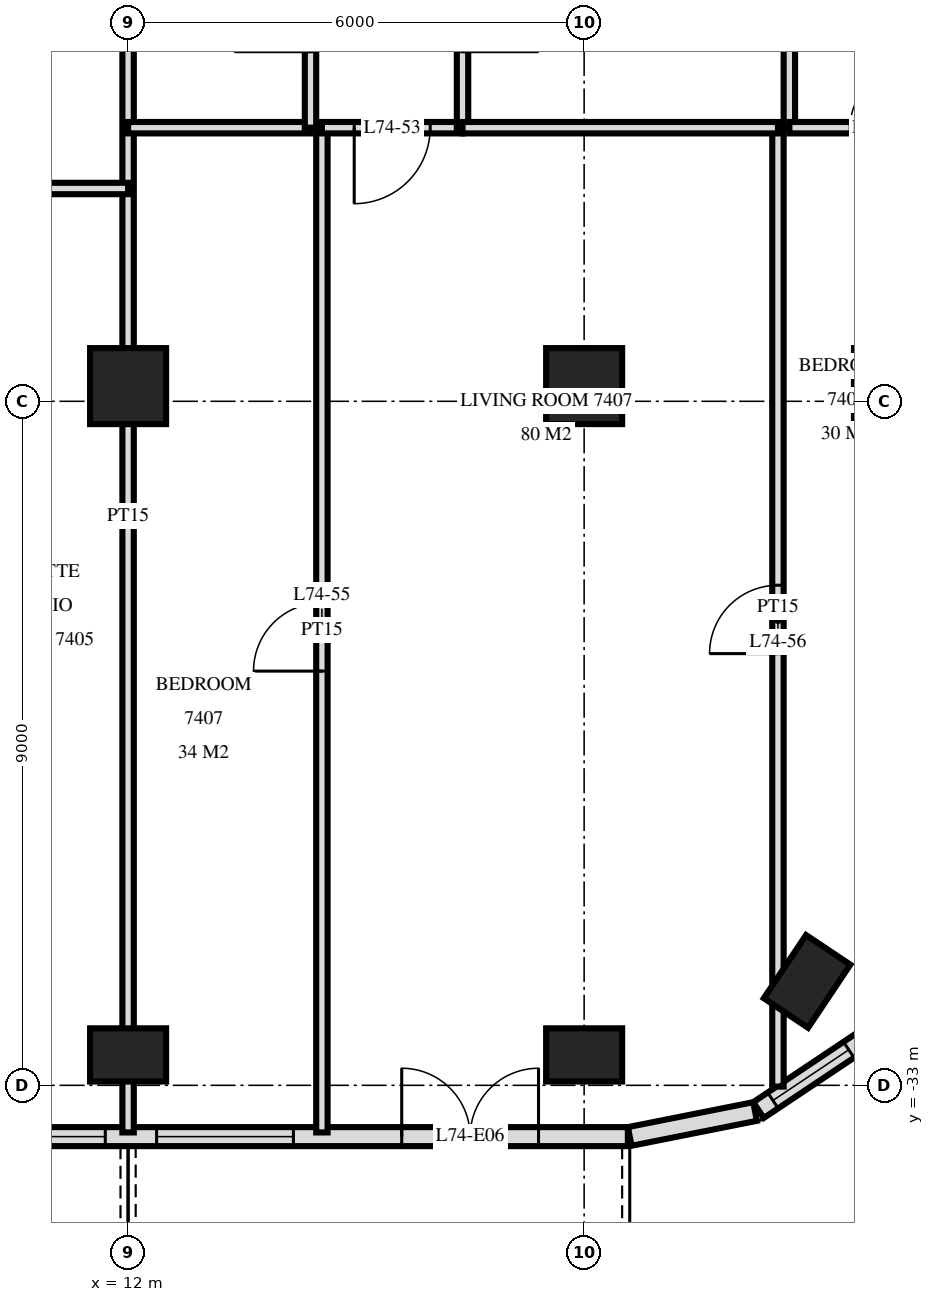
"""IFC4 building model, lengths in metres.
Left out: names, types, materials, properties, quantities, classifications, styles, units other than length and angle.
Written with IfcOpenShell. Run it as: python <this file> out.ifc"""

import sys

from ifc_helpers import new_model, si_unit, direction, frame, frame_2d, origin, origin_2d, place, context, subcontext, project, spatial, rectangle, extrude, element, fill, save


model = new_model("IFC4")
c1 = context("Model", 3, precision=1e-05, world=origin(), true_north=direction((0.0, 1.0)))
c2 = subcontext(c1, "Body", "Model", "MODEL_VIEW")
j1 = project(units=[si_unit("LENGTHUNIT", "METRE"), si_unit("PLANEANGLEUNIT", "RADIAN")], contexts=[c1])
p1 = place(None, origin())
s1 = spatial("IfcSite", under=j1, at=p1, CompositionType="ELEMENT")
p2 = place(p1, origin())
s2 = spatial("IfcBuilding", under=s1, at=p2, CompositionType="ELEMENT")
p3 = place(p2, frame((0.0, 0.0, 280.6)))
s3 = spatial("IfcBuildingStorey", under=s2, at=p3, CompositionType="ELEMENT", Elevation=280.6)
p4 = place(p3, frame((12.0, -32.6, 0.0), z_axis=(0.0, 0.0, 1.0), x_axis=(1.0, 0.0, 0.0)))
e1 = element("IfcColumn", 1, at=p4, inside=s3, PredefinedType="COLUMN", context=c2, shape_type="SweptSolid", body=[
    extrude(rectangle(XDim=1.0, YDim=0.7, at=origin_2d()), origin(), (0.0, 0.0, 1.0), 3.5),
])
p5 = place(p3, frame((12.0, -23.8, 0.0), z_axis=(0.0, 0.0, 1.0), x_axis=(1.0, 0.0, 0.0)))
e2 = element("IfcColumn", 2, at=p5, inside=s3, PredefinedType="COLUMN", context=c2, shape_type="SweptSolid", body=[
    extrude(rectangle(XDim=1.0, YDim=1.0, at=origin_2d()), origin(), (0.0, 0.0, 1.0), 3.5),
])
p6 = place(p3, frame((18.0, -32.6, 0.0), z_axis=(0.0, 0.0, 1.0), x_axis=(1.0, 0.0, 0.0)))
e3 = element("IfcColumn", 3, at=p6, inside=s3, PredefinedType="COLUMN", context=c2, shape_type="SweptSolid", body=[
    extrude(rectangle(XDim=1.0, YDim=0.7, at=origin_2d()), origin(), (0.0, 0.0, 1.0), 3.5),
])
p7 = place(p3, frame((18.0, -23.8, 0.0), z_axis=(0.0, 0.0, 1.0), x_axis=(1.0, 0.0, 0.0)))
e4 = element("IfcColumn", 4, at=p7, inside=s3, PredefinedType="COLUMN", context=c2, shape_type="SweptSolid", body=[
    extrude(rectangle(XDim=1.0, YDim=1.0, at=origin_2d()), origin(), (0.0, 0.0, 1.0), 3.5),
])
for number, where, z_axis, x_axis in (
    (5, (20.933, -31.633, 0.0), (0.0, 0.0, 1.0), (0.556, 0.831, 0.0)),
    (6, (21.9, -23.8, 0.0), (0.0, 0.0, 1.0), (0.0, 1.0, 0.0)),
):
    element("IfcColumn", number, at=place(p3, frame(where, z_axis=z_axis, x_axis=x_axis)), inside=s3, PredefinedType="COLUMN", context=c2, shape_type="SweptSolid", body=[
        extrude(rectangle(XDim=1.0, YDim=0.7, at=origin_2d()), origin(), (0.0, 0.0, 1.0), 3.5),
    ])
p8 = place(p3, frame((-18.575, -33.675, 0.0), z_axis=(0.0, 0.0, 1.0), x_axis=(1.0, 0.0, 0.0)))
e7 = element("IfcWall", 7, at=p8, inside=s3, PredefinedType="SOLIDWALL", context=c2, shape_type="SweptSolid", body=[
    extrude(rectangle(XDim=37.151, YDim=0.25, at=frame_2d((18.575, 0.0))), origin(), (0.0, 0.0, 1.0), 3.22),
])
p9 = place(p8, frame((4.175, 0.0, 0.0)))
e8 = element("IfcOpeningElement", 8, at=p9, cuts=e7, PredefinedType="OPENING", context=c2, shape_type="SweptSolid", body=[
    extrude(rectangle(XDim=1.8, YDim=2.4, at=frame_2d((0.9, 1.2))), frame((0.0, 0.135, 0.0), z_axis=(0.0, -1.0, 0.0), x_axis=(1.0, 0.0, 0.0)), (0.0, 0.0, 1.0), 0.27),
])
p10 = place(p8, frame((7.512, 0.0, 0.0)))
e9 = element("IfcOpeningElement", 9, at=p10, cuts=e7, PredefinedType="OPENING", context=c2, shape_type="SweptSolid", body=[
    extrude(rectangle(XDim=1.8, YDim=2.4, at=frame_2d((0.9, 1.2))), frame((0.0, 0.135, 0.0), z_axis=(0.0, -1.0, 0.0), x_axis=(1.0, 0.0, 0.0)), (0.0, 0.0, 1.0), 0.27),
])
p11 = place(p8, frame((10.287, 0.0, 0.9)))
e10 = element("IfcOpeningElement", 10, at=p11, cuts=e7, PredefinedType="OPENING", context=c2, shape_type="SweptSolid", body=[
    extrude(rectangle(XDim=1.8, YDim=1.5, at=frame_2d((0.9, 0.75))), frame((0.0, 0.135, 0.0), z_axis=(0.0, -1.0, 0.0), x_axis=(1.0, 0.0, 0.0)), (0.0, 0.0, 1.0), 0.27),
])
p12 = place(p8, frame((12.875, 0.0, 0.9)))
e11 = element("IfcOpeningElement", 11, at=p12, cuts=e7, PredefinedType="OPENING", context=c2, shape_type="SweptSolid", body=[
    extrude(rectangle(XDim=2.4, YDim=1.5, at=frame_2d((1.2, 0.75))), frame((0.0, 0.135, 0.0), z_axis=(0.0, -1.0, 0.0), x_axis=(1.0, 0.0, 0.0)), (0.0, 0.0, 1.0), 0.27),
])
p13 = place(p8, frame((16.175, 0.0, 0.0)))
e12 = element("IfcOpeningElement", 12, at=p13, cuts=e7, PredefinedType="OPENING", context=c2, shape_type="SweptSolid", body=[
    extrude(rectangle(XDim=1.8, YDim=2.4, at=frame_2d((0.9, 1.2))), frame((0.0, 0.135, 0.0), z_axis=(0.0, -1.0, 0.0), x_axis=(1.0, 0.0, 0.0)), (0.0, 0.0, 1.0), 0.27),
])
p14 = place(p8, frame((19.175, 0.0, 0.0)))
e13 = element("IfcOpeningElement", 13, at=p14, cuts=e7, PredefinedType="OPENING", context=c2, shape_type="SweptSolid", body=[
    extrude(rectangle(XDim=1.8, YDim=2.4, at=frame_2d((0.9, 1.2))), frame((0.0, 0.135, 0.0), z_axis=(0.0, -1.0, 0.0), x_axis=(1.0, 0.0, 0.0)), (0.0, 0.0, 1.0), 0.27),
])
p15 = place(p8, frame((21.875, 0.0, 0.9)))
e14 = element("IfcOpeningElement", 14, at=p15, cuts=e7, PredefinedType="OPENING", context=c2, shape_type="SweptSolid", body=[
    extrude(rectangle(XDim=2.4, YDim=1.5, at=frame_2d((1.2, 0.75))), frame((0.0, 0.135, 0.0), z_axis=(0.0, -1.0, 0.0), x_axis=(1.0, 0.0, 0.0)), (0.0, 0.0, 1.0), 0.27),
])
p16 = place(p8, frame((25.175, 0.0, 0.0)))
e15 = element("IfcOpeningElement", 15, at=p16, cuts=e7, PredefinedType="OPENING", context=c2, shape_type="SweptSolid", body=[
    extrude(rectangle(XDim=1.8, YDim=2.4, at=frame_2d((0.9, 1.2))), frame((0.0, 0.135, 0.0), z_axis=(0.0, -1.0, 0.0), x_axis=(1.0, 0.0, 0.0)), (0.0, 0.0, 1.0), 0.27),
])
p17 = place(p8, frame((27.875, 0.0, 0.9)))
e16 = element("IfcOpeningElement", 16, at=p17, cuts=e7, PredefinedType="OPENING", context=c2, shape_type="SweptSolid", body=[
    extrude(rectangle(XDim=2.4, YDim=1.5, at=frame_2d((1.2, 0.75))), frame((0.0, 0.135, 0.0), z_axis=(0.0, -1.0, 0.0), x_axis=(1.0, 0.0, 0.0)), (0.0, 0.0, 1.0), 0.27),
])
p18 = place(p8, frame((30.95, 0.0, 0.9)))
e17 = element("IfcOpeningElement", 17, at=p18, cuts=e7, PredefinedType="OPENING", context=c2, shape_type="SweptSolid", body=[
    extrude(rectangle(XDim=1.8, YDim=1.5, at=frame_2d((0.9, 0.75))), frame((0.0, 0.135, 0.0), z_axis=(0.0, -1.0, 0.0), x_axis=(1.0, 0.0, 0.0)), (0.0, 0.0, 1.0), 0.27),
])
p19 = place(p8, frame((34.175, 0.0, 0.0)))
e18 = element("IfcOpeningElement", 18, at=p19, cuts=e7, PredefinedType="OPENING", context=c2, shape_type="SweptSolid", body=[
    extrude(rectangle(XDim=1.8, YDim=2.4, at=frame_2d((0.9, 1.2))), frame((0.0, 0.135, 0.0), z_axis=(0.0, -1.0, 0.0), x_axis=(1.0, 0.0, 0.0)), (0.0, 0.0, 1.0), 0.27),
])
p20 = place(p3, frame((18.6, -33.673, 0.0), z_axis=(0.0, 0.0, 1.0), x_axis=(0.980770110232, 0.195166572128, 0.0)))
e19 = element("IfcWall", 19, at=p20, inside=s3, PredefinedType="SOLIDWALL", context=c2, shape_type="SweptSolid", body=[
    extrude(rectangle(XDim=1.681, YDim=0.25, at=frame_2d((0.841, 0.0))), origin(), (0.0, 0.0, 1.0), 3.22),
])
p21 = place(p3, frame((20.294, -33.326, 0.0), z_axis=(0.0, 0.0, 1.0), x_axis=(0.831482937015, 0.55555029066, 0.0)))
e20 = element("IfcWall", 20, at=p21, inside=s3, PredefinedType="SOLIDWALL", context=c2, shape_type="SweptSolid", body=[
    extrude(rectangle(XDim=1.656, YDim=0.25, at=frame_2d((0.828, 0.0))), origin(), (0.0, 0.0, 1.0), 3.22),
])
p22 = place(p21, frame((0.228, 0.0, 0.9)))
e21 = element("IfcOpeningElement", 21, at=p22, cuts=e20, PredefinedType="OPENING", context=c2, shape_type="SweptSolid", body=[
    extrude(rectangle(XDim=1.2, YDim=1.5, at=frame_2d((0.6, 0.75))), frame((0.0, 0.135, 0.0), z_axis=(0.0, -1.0, 0.0), x_axis=(1.0, 0.0, 0.0)), (0.0, 0.0, 1.0), 0.27),
])
p23 = place(p3, frame((20.7, -20.4, 0.0), z_axis=(0.0, 0.0, 1.0), x_axis=(0.0, 1.0, 0.0)))
e22 = element("IfcWall", 22, at=p23, inside=s3, PredefinedType="PARTITIONING", context=c2, shape_type="SweptSolid", body=[
    extrude(rectangle(XDim=3.0, YDim=0.15, at=frame_2d((1.5, 0.0))), origin(), (0.0, 0.0, 1.0), 3.22),
])
p24 = place(p3, frame((20.55, -33.017, 0.0), z_axis=(0.0, 0.0, 1.0), x_axis=(0.0, 1.0, 0.0)))
e23 = element("IfcWall", 23, at=p24, inside=s3, PredefinedType="PARTITIONING", context=c2, shape_type="SweptSolid", body=[
    extrude(rectangle(XDim=12.617, YDim=0.15, at=frame_2d((6.308, 0.0))), origin(), (0.0, 0.0, 1.0), 3.22),
])
p25 = place(p24, frame((5.697, 0.0, 0.0)))
e24 = element("IfcOpeningElement", 24, at=p25, cuts=e23, PredefinedType="OPENING", context=c2, shape_type="SweptSolid", body=[
    extrude(rectangle(XDim=0.9, YDim=2.1, at=frame_2d((0.45, 1.05))), frame((0.0, 0.085, 0.0), z_axis=(0.0, -1.0, 0.0), x_axis=(1.0, 0.0, 0.0)), (0.0, 0.0, 1.0), 0.17),
])
p26 = place(p3, frame((16.4, -20.4, 0.0), z_axis=(0.0, 0.0, 1.0), x_axis=(0.0, 1.0, 0.0)))
e25 = element("IfcWall", 25, at=p26, inside=s3, PredefinedType="PARTITIONING", context=c2, shape_type="SweptSolid", body=[
    extrude(rectangle(XDim=3.0, YDim=0.15, at=frame_2d((1.5, 0.0))), origin(), (0.0, 0.0, 1.0), 3.22),
])
p27 = place(p26, frame((1.0, 0.0, 0.0)))
e26 = element("IfcOpeningElement", 26, at=p27, cuts=e25, PredefinedType="OPENING", context=c2, shape_type="SweptSolid", body=[
    extrude(rectangle(XDim=1.0, YDim=2.1, at=frame_2d((0.5, 1.05))), frame((0.0, 0.085, 0.0), z_axis=(0.0, -1.0, 0.0), x_axis=(1.0, 0.0, 0.0)), (0.0, 0.0, 1.0), 0.17),
])
p28 = place(p3, frame((14.55, -33.62, 0.0), z_axis=(0.0, 0.0, 1.0), x_axis=(0.0, 1.0, 0.0)))
e27 = element("IfcWall", 27, at=p28, inside=s3, PredefinedType="PARTITIONING", context=c2, shape_type="SweptSolid", body=[
    extrude(rectangle(XDim=13.22, YDim=0.15, at=frame_2d((6.61, 0.0))), origin(), (0.0, 0.0, 1.0), 3.22),
])
p29 = place(p28, frame((6.07, 0.0, 0.0)))
e28 = element("IfcOpeningElement", 28, at=p29, cuts=e27, PredefinedType="OPENING", context=c2, shape_type="SweptSolid", body=[
    extrude(rectangle(XDim=0.9, YDim=2.1, at=frame_2d((0.45, 1.05))), frame((0.0, 0.085, 0.0), z_axis=(0.0, -1.0, 0.0), x_axis=(1.0, 0.0, 0.0)), (0.0, 0.0, 1.0), 0.17),
])
p30 = place(p3, frame((14.4, -20.4, 0.0), z_axis=(0.0, 0.0, 1.0), x_axis=(0.0, 1.0, 0.0)))
e29 = element("IfcWall", 29, at=p30, inside=s3, PredefinedType="PARTITIONING", context=c2, shape_type="SweptSolid", body=[
    extrude(rectangle(XDim=3.0, YDim=0.15, at=frame_2d((1.5, 0.0))), origin(), (0.0, 0.0, 1.0), 3.22),
])
p31 = place(p30, frame((1.0, 0.0, 0.0)))
e30 = element("IfcOpeningElement", 30, at=p31, cuts=e29, PredefinedType="OPENING", context=c2, shape_type="SweptSolid", body=[
    extrude(rectangle(XDim=1.0, YDim=2.1, at=frame_2d((0.5, 1.05))), frame((0.0, 0.085, 0.0), z_axis=(0.0, -1.0, 0.0), x_axis=(1.0, 0.0, 0.0)), (0.0, 0.0, 1.0), 0.17),
])
p32 = place(p3, frame((12.0, -33.62, 0.0), z_axis=(0.0, 0.0, 1.0), x_axis=(0.0, 1.0, 0.0)))
e31 = element("IfcWall", 31, at=p32, inside=s3, PredefinedType="PARTITIONING", context=c2, shape_type="SweptSolid", body=[
    extrude(rectangle(XDim=16.22, YDim=0.15, at=frame_2d((8.11, 0.0))), origin(), (0.0, 0.0, 1.0), 3.22),
])
p33 = place(p3, frame((10.3, -21.2, 0.0), z_axis=(0.0, 0.0, 1.0), x_axis=(1.0, 0.0, 0.0)))
e32 = element("IfcWall", 32, at=p33, inside=s3, PredefinedType="PARTITIONING", context=c2, shape_type="SweptSolid", body=[
    extrude(rectangle(XDim=1.7, YDim=0.15, at=frame_2d((0.85, 0.0))), origin(), (0.0, 0.0, 1.0), 3.22),
])
p34 = place(p3, frame((14.55, -20.4, 0.0), z_axis=(0.0, 0.0, 1.0), x_axis=(1.0, 0.0, 0.0)))
e33 = element("IfcWall", 33, at=p34, inside=s3, PredefinedType="PARTITIONING", context=c2, shape_type="SweptSolid", body=[
    extrude(rectangle(XDim=1.85, YDim=0.15, at=frame_2d((0.925, 0.0))), origin(), (0.0, 0.0, 1.0), 3.22),
])
p35 = place(p34, frame((0.425, 0.0, 0.0)))
e34 = element("IfcOpeningElement", 34, at=p35, cuts=e33, PredefinedType="OPENING", context=c2, shape_type="SweptSolid", body=[
    extrude(rectangle(XDim=1.0, YDim=2.1, at=frame_2d((0.5, 1.05))), frame((0.0, 0.085, 0.0), z_axis=(0.0, -1.0, 0.0), x_axis=(1.0, 0.0, 0.0)), (0.0, 0.0, 1.0), 0.17),
])
p36 = place(p3, frame((12.0, -20.4, 0.0), z_axis=(0.0, 0.0, 1.0), x_axis=(1.0, 0.0, 0.0)))
e35 = element("IfcWall", 35, at=p36, inside=s3, PredefinedType="PARTITIONING", context=c2, shape_type="SweptSolid", body=[
    extrude(rectangle(XDim=2.4, YDim=0.15, at=frame_2d((1.2, 0.0))), origin(), (0.0, 0.0, 1.0), 3.22),
])
p37 = place(p3, frame((16.4, -20.4, 0.0), z_axis=(0.0, 0.0, 1.0), x_axis=(1.0, 0.0, 0.0)))
e36 = element("IfcWall", 36, at=p37, inside=s3, PredefinedType="PARTITIONING", context=c2, shape_type="SweptSolid", body=[
    extrude(rectangle(XDim=4.15, YDim=0.15, at=frame_2d((2.075, 0.0))), origin(), (0.0, 0.0, 1.0), 3.22),
])
p38 = place(p3, frame((20.7, -20.4, 0.0), z_axis=(0.0, 0.0, 1.0), x_axis=(1.0, 0.0, 0.0)))
e37 = element("IfcWall", 37, at=p38, inside=s3, PredefinedType="PARTITIONING", context=c2, shape_type="SweptSolid", body=[
    extrude(rectangle(XDim=2.22, YDim=0.15, at=frame_2d((1.11, 0.0))), origin(), (0.0, 0.0, 1.0), 3.22),
])
p39 = place(p38, frame((0.8, 0.0, 0.0)))
e38 = element("IfcOpeningElement", 38, at=p39, cuts=e37, PredefinedType="OPENING", context=c2, shape_type="SweptSolid", body=[
    extrude(rectangle(XDim=0.8, YDim=2.1, at=frame_2d((0.4, 1.05))), frame((0.0, 0.085, 0.0), z_axis=(0.0, -1.0, 0.0), x_axis=(1.0, 0.0, 0.0)), (0.0, 0.0, 1.0), 0.17),
])
p40 = place(p22, origin())
e39 = element("IfcWindow", 39, at=p40, inside=s3, PartitioningType="SINGLE_PANEL", PredefinedType="WINDOW", context=c2, shape_type="SweptSolid", body=[
    extrude(rectangle(XDim=1.2, YDim=1.5, at=frame_2d((0.6, 0.75))), frame((0.0, 0.03, 0.0), z_axis=(0.0, -1.0, 0.0), x_axis=(1.0, 0.0, 0.0)), (0.0, 0.0, 1.0), 0.06),
])
fill(e21, e39)
p41 = place(p17, origin())
e40 = element("IfcWindow", 40, at=p41, inside=s3, PartitioningType="SINGLE_PANEL", PredefinedType="WINDOW", context=c2, shape_type="SweptSolid", body=[
    extrude(rectangle(XDim=2.4, YDim=1.5, at=frame_2d((1.2, 0.75))), frame((0.0, 0.03, 0.0), z_axis=(0.0, -1.0, 0.0), x_axis=(1.0, 0.0, 0.0)), (0.0, 0.0, 1.0), 0.06),
])
fill(e16, e40)
p42 = place(p18, origin())
e41 = element("IfcWindow", 41, at=p42, inside=s3, PartitioningType="SINGLE_PANEL", PredefinedType="WINDOW", context=c2, shape_type="SweptSolid", body=[
    extrude(rectangle(XDim=1.8, YDim=1.5, at=frame_2d((0.9, 0.75))), frame((0.0, 0.03, 0.0), z_axis=(0.0, -1.0, 0.0), x_axis=(1.0, 0.0, 0.0)), (0.0, 0.0, 1.0), 0.06),
])
fill(e17, e41)
p43 = place(p19, origin())
e42 = element("IfcDoor", 42, at=p43, inside=s3, OperationType="DOUBLE_DOOR_SINGLE_SWING", PredefinedType="DOOR", context=c2, shape_type="SweptSolid", body=[
    extrude(rectangle(XDim=1.8, YDim=2.4, at=frame_2d((0.9, 1.2))), frame((0.0, 0.025, 0.0), z_axis=(0.0, -1.0, 0.0), x_axis=(1.0, 0.0, 0.0)), (0.0, 0.0, 1.0), 0.05),
])
fill(e18, e42)
p44 = place(p35, frame((0.5, 0.0, 0.0), z_axis=(0.0, 0.0, 1.0), x_axis=(-1.0, 0.0, 0.0)))
e43 = element("IfcDoor", 43, at=p44, inside=s3, OperationType="SINGLE_SWING_LEFT", PredefinedType="DOOR", context=c2, shape_type="SweptSolid", body=[
    extrude(rectangle(XDim=1.0, YDim=2.1, at=frame_2d((0.0, 1.05))), frame((0.0, -0.025, 0.0), z_axis=(0.0, 1.0, 0.0), x_axis=(-1.0, 0.0, 0.0)), (0.0, 0.0, 1.0), 0.05),
])
fill(e34, e43)
p45 = place(p39, origin())
e44 = element("IfcDoor", 44, at=p45, inside=s3, OperationType="SINGLE_SWING_LEFT", PredefinedType="DOOR", context=c2, shape_type="SweptSolid", body=[
    extrude(rectangle(XDim=0.8, YDim=2.1, at=frame_2d((0.4, 1.05))), frame((0.0, 0.025, 0.0), z_axis=(0.0, -1.0, 0.0), x_axis=(1.0, 0.0, 0.0)), (0.0, 0.0, 1.0), 0.05),
])
fill(e38, e44)
p46 = place(p29, origin())
e45 = element("IfcDoor", 45, at=p46, inside=s3, OperationType="SINGLE_SWING_RIGHT", PredefinedType="DOOR", context=c2, shape_type="SweptSolid", body=[
    extrude(rectangle(XDim=0.9, YDim=2.1, at=frame_2d((0.45, 1.05))), frame((0.0, 0.025, 0.0), z_axis=(0.0, -1.0, 0.0), x_axis=(1.0, 0.0, 0.0)), (0.0, 0.0, 1.0), 0.05),
])
fill(e28, e45)
p47 = place(p25, origin())
e46 = element("IfcDoor", 46, at=p47, inside=s3, OperationType="SINGLE_SWING_RIGHT", PredefinedType="DOOR", context=c2, shape_type="SweptSolid", body=[
    extrude(rectangle(XDim=0.9, YDim=2.1, at=frame_2d((0.45, 1.05))), frame((0.0, 0.025, 0.0), z_axis=(0.0, -1.0, 0.0), x_axis=(1.0, 0.0, 0.0)), (0.0, 0.0, 1.0), 0.05),
])
fill(e24, e46)
save(model, sys.argv[1])
